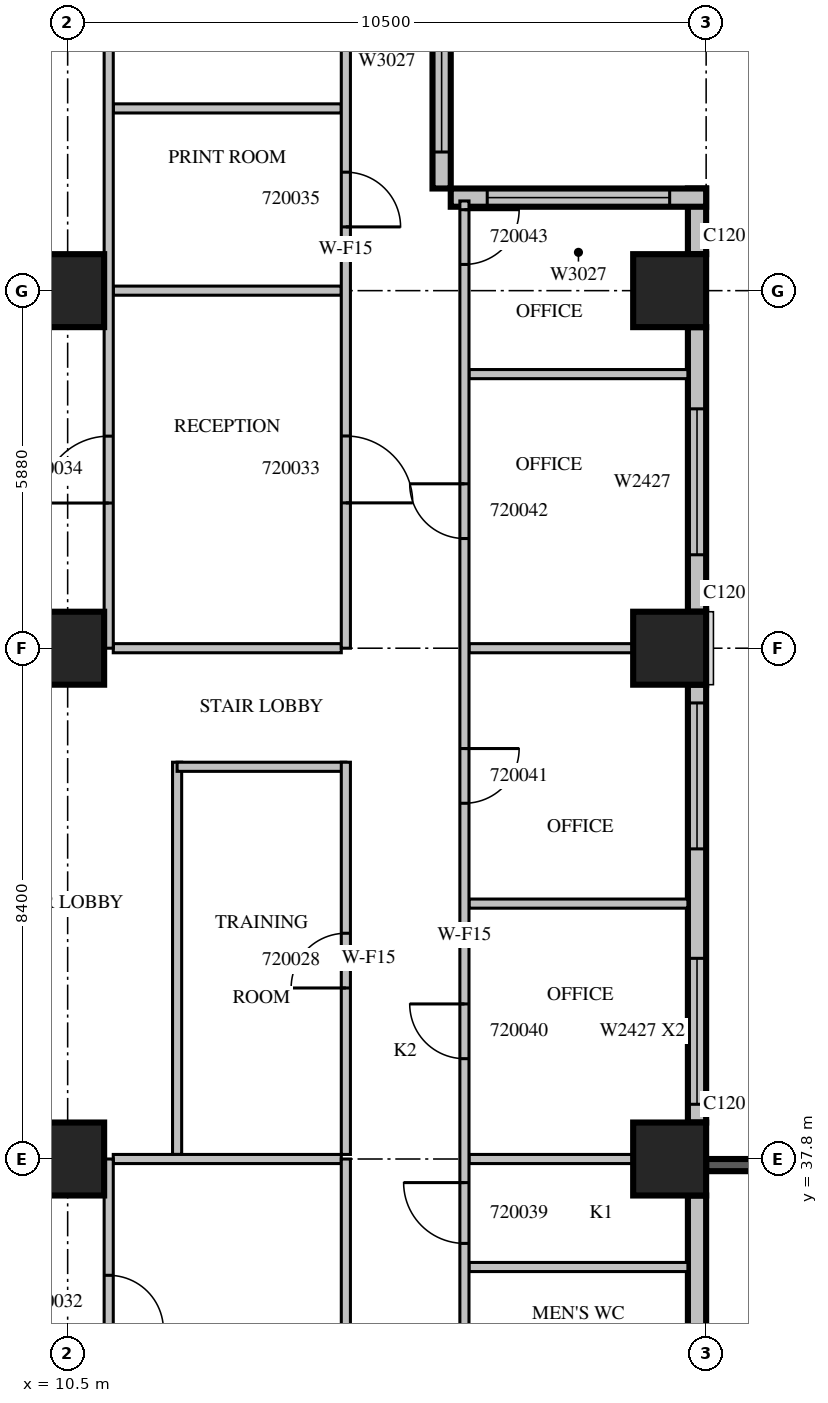
"""IFC4 building model, lengths in metres.
Left out: names, types, materials, properties, quantities, classifications, styles, units other than length and angle.
Written with IfcOpenShell. Run it as: python <this file> out.ifc"""

import sys

from ifc_helpers import new_model, si_unit, direction, frame, frame_2d, origin, origin_2d, place, context, subcontext, project, spatial, rectangle, extrude, source, transform, mapped, element, fill, save


model = new_model("IFC4")
c1 = context("Model", 3, precision=1e-05, world=origin(), true_north=direction((0.0, 1.0)))
c2 = subcontext(c1, "Body", "Model", "MODEL_VIEW")
j1 = project(units=[si_unit("LENGTHUNIT", "METRE"), si_unit("PLANEANGLEUNIT", "RADIAN")], contexts=[c1])
p1 = place(None, origin())
s1 = spatial("IfcSite", under=j1, at=p1, CompositionType="ELEMENT")
p2 = place(p1, origin())
s2 = spatial("IfcBuilding", under=s1, at=p2, CompositionType="ELEMENT")
p3 = place(p2, frame((0.0, 0.0, 95.1)))
s3 = spatial("IfcBuildingStorey", under=s2, at=p3, CompositionType="ELEMENT", Elevation=95.1)
m1 = source(origin(), c2, "Body", "SweptSolid", [
    extrude(rectangle(XDim=1.2, YDim=1.2, at=origin_2d()), origin(), (0.0, 0.0, 1.0), 4.2),
])
for number, where, z_axis, x_axis in (
    (1, (10.5, 37.8, 0.0), (0.0, 0.0, 1.0), (1.0, 0.0, 0.0)),
    (2, (20.4, 37.8, 0.0), (0.0, 0.0, 1.0), (1.0, 0.0, 0.0)),
    (3, (10.5, 46.2, 0.0), (0.0, 0.0, 1.0), (1.0, 0.0, 0.0)),
    (4, (20.4, 46.2, 0.0), (0.0, 0.0, 1.0), (1.0, 0.0, 0.0)),
    (5, (10.5, 52.08, 0.0), (0.0, 0.0, 1.0), (1.0, 0.0, 0.0)),
    (6, (20.4, 52.08, 0.0), (0.0, 0.0, 1.0), (1.0, 0.0, 0.0)),
):
    element("IfcColumn", number, at=place(p3, frame(where, z_axis=z_axis, x_axis=x_axis)), inside=s3, PredefinedType="COLUMN", context=c2, shape_type="MappedRepresentation", body=[
        mapped(m1, transform((0.0, 0.0, 0.0), scale=1.0)),
    ])
m2 = source(origin(), c2, "Body", "SweptSolid", [
    extrude(rectangle(XDim=3.9, YDim=0.2, at=frame_2d((1.95, 0.0))), origin(), (0.0, 0.0, 1.0), 3.8),
])
p4 = place(p3, frame((21.0, 37.7, 0.0), z_axis=(0.0, 0.0, 1.0), x_axis=(1.0, 0.0, 0.0)))
e7 = element("IfcWall", 7, at=p4, inside=s3, PredefinedType="SOLIDWALL", context=c2, shape_type="MappedRepresentation", body=[
    mapped(m2, transform((0.0, 0.0, 0.0), scale=1.0)),
])
m3 = source(origin(), c2, "Body", "SweptSolid", [
    extrude(rectangle(XDim=2.4, YDim=2.7, at=frame_2d((1.2, 1.35))), frame((0.0, 0.11, 0.0), z_axis=(0.0, -1.0, 0.0), x_axis=(1.0, 0.0, 0.0)), (0.0, 0.0, 1.0), 0.22),
])
p5 = place(p4, frame((0.75, 0.0, 0.6)))
e8 = element("IfcOpeningElement", 8, at=p5, cuts=e7, PredefinedType="OPENING", context=c2, shape_type="MappedRepresentation", body=[
    mapped(m3, transform((0.0, 0.0, 0.0), scale=1.0)),
])
m4 = source(origin(), c2, "Body", "SweptSolid", [
    extrude(rectangle(XDim=7.2, YDim=0.3, at=frame_2d((3.6, 0.0))), origin(), (0.0, 0.0, 1.0), 3.8),
])
p6 = place(p3, frame((20.85, 30.0, 0.0), z_axis=(0.0, 0.0, 1.0), x_axis=(0.0, 1.0, 0.0)))
e9 = element("IfcWall", 9, at=p6, inside=s3, PredefinedType="STANDARD", context=c2, shape_type="MappedRepresentation", body=[
    mapped(m4, transform((0.0, 0.0, 0.0), scale=1.0)),
])
m5 = source(origin(), c2, "Body", "SweptSolid", [
    extrude(rectangle(XDim=1.0, YDim=2.1, at=frame_2d((0.5, 1.05))), frame((0.0, 0.16, 0.0), z_axis=(0.0, -1.0, 0.0), x_axis=(1.0, 0.0, 0.0)), (0.0, 0.0, 1.0), 0.32),
])
p7 = place(p6, frame((1.0, 0.0, 0.0)))
e10 = element("IfcOpeningElement", 10, at=p7, cuts=e9, PredefinedType="OPENING", context=c2, shape_type="MappedRepresentation", body=[
    mapped(m5, transform((0.0, 0.0, 0.0), scale=1.0)),
])
p8 = place(p3, frame((20.85, 38.4, 0.0), z_axis=(0.0, 0.0, 1.0), x_axis=(0.0, 1.0, 0.0)))
e11 = element("IfcWall", 11, at=p8, inside=s3, PredefinedType="STANDARD", context=c2, shape_type="MappedRepresentation", body=[
    mapped(m4, transform((0.0, 0.0, 0.0), scale=1.0)),
])
m6 = source(origin(), c2, "Body", "SweptSolid", [
    extrude(rectangle(XDim=2.4, YDim=2.7, at=frame_2d((1.2, 1.35))), frame((0.0, 0.16, 0.0), z_axis=(0.0, -1.0, 0.0), x_axis=(1.0, 0.0, 0.0)), (0.0, 0.0, 1.0), 0.32),
])
p9 = place(p8, frame((0.3, 0.0, 0.6)))
e12 = element("IfcOpeningElement", 12, at=p9, cuts=e11, PredefinedType="OPENING", context=c2, shape_type="MappedRepresentation", body=[
    mapped(m6, transform((0.0, 0.0, 0.0), scale=1.0)),
])
p10 = place(p8, frame((4.5, 0.0, 0.6)))
e13 = element("IfcOpeningElement", 13, at=p10, cuts=e11, PredefinedType="OPENING", context=c2, shape_type="MappedRepresentation", body=[
    mapped(m6, transform((0.0, 0.0, 0.0), scale=1.0)),
])
m7 = source(origin(), c2, "Body", "SweptSolid", [
    extrude(rectangle(XDim=4.68, YDim=0.3, at=frame_2d((2.34, 0.0))), origin(), (0.0, 0.0, 1.0), 3.8),
])
p11 = place(p3, frame((20.85, 46.8, 0.0), z_axis=(0.0, 0.0, 1.0), x_axis=(0.0, 1.0, 0.0)))
e14 = element("IfcWall", 14, at=p11, inside=s3, PredefinedType="STANDARD", context=c2, shape_type="MappedRepresentation", body=[
    mapped(m7, transform((0.0, 0.0, 0.0), scale=1.0)),
])
p12 = place(p11, frame((0.936, 0.0, 0.6)))
e15 = element("IfcOpeningElement", 15, at=p12, cuts=e14, PredefinedType="OPENING", context=c2, shape_type="MappedRepresentation", body=[
    mapped(m6, transform((0.0, 0.0, 0.0), scale=1.0)),
])
m8 = source(origin(), c2, "Body", "SweptSolid", [
    extrude(rectangle(XDim=1.08, YDim=0.3, at=frame_2d((0.54, 0.0))), origin(), (0.0, 0.0, 1.0), 3.8),
])
p13 = place(p3, frame((20.85, 52.68, 0.0), z_axis=(0.0, 0.0, 1.0), x_axis=(0.0, 1.0, 0.0)))
e16 = element("IfcWall", 16, at=p13, inside=s3, PredefinedType="STANDARD", context=c2, shape_type="MappedRepresentation", body=[
    mapped(m8, transform((0.0, 0.0, 0.0), scale=1.0)),
])
m9 = source(origin(), c2, "Body", "SweptSolid", [
    extrude(rectangle(XDim=4.2, YDim=0.3, at=frame_2d((2.1, 0.0))), origin(), (0.0, 0.0, 1.0), 3.8),
])
p14 = place(p3, frame((21.0, 53.61, 0.0), z_axis=(0.0, 0.0, 1.0), x_axis=(-1.0, 0.0, 0.0)))
e17 = element("IfcWall", 17, at=p14, inside=s3, PredefinedType="STANDARD", context=c2, shape_type="MappedRepresentation", body=[
    mapped(m9, transform((0.0, 0.0, 0.0), scale=1.0)),
])
m10 = source(origin(), c2, "Body", "SweptSolid", [
    extrude(rectangle(XDim=3.0, YDim=2.7, at=frame_2d((1.5, 1.35))), frame((0.0, 0.16, 0.0), z_axis=(0.0, -1.0, 0.0), x_axis=(1.0, 0.0, 0.0)), (0.0, 0.0, 1.0), 0.32),
])
p15 = place(p14, frame((0.6, 0.0, 0.6)))
e18 = element("IfcOpeningElement", 18, at=p15, cuts=e17, PredefinedType="OPENING", context=c2, shape_type="MappedRepresentation", body=[
    mapped(m10, transform((0.0, 0.0, 0.0), scale=1.0)),
])
p16 = place(p3, frame((16.65, 53.76, 0.0), z_axis=(0.0, 0.0, 1.0), x_axis=(0.0, 1.0, 0.0)))
e19 = element("IfcWall", 19, at=p16, inside=s3, PredefinedType="STANDARD", context=c2, shape_type="MappedRepresentation", body=[
    mapped(m9, transform((0.0, 0.0, 0.0), scale=1.0)),
])
p17 = place(p16, frame((0.6, 0.0, 0.6)))
e20 = element("IfcOpeningElement", 20, at=p17, cuts=e19, PredefinedType="OPENING", context=c2, shape_type="MappedRepresentation", body=[
    mapped(m10, transform((0.0, 0.0, 0.0), scale=1.0)),
])
m11 = source(origin(), c2, "Body", "SweptSolid", [
    extrude(rectangle(XDim=6.45, YDim=0.15, at=frame_2d((3.225, 0.0))), origin(), (0.0, 0.0, 1.0), 3.8),
])
p18 = place(p3, frame((12.3, 44.325, 0.0), z_axis=(0.0, 0.0, 1.0), x_axis=(0.0, -1.0, 0.0)))
e21 = element("IfcWall", 21, at=p18, inside=s3, PredefinedType="PARTITIONING", context=c2, shape_type="MappedRepresentation", body=[
    mapped(m11, transform((0.0, 0.0, 0.0), scale=1.0)),
])
m12 = source(origin(), c2, "Body", "SweptSolid", [
    extrude(rectangle(XDim=2.775, YDim=0.15, at=frame_2d((1.387, 0.0))), origin(), (0.0, 0.0, 1.0), 3.8),
])
p19 = place(p3, frame((15.075, 44.25, 0.0), z_axis=(0.0, 0.0, 1.0), x_axis=(-1.0, 0.0, 0.0)))
e22 = element("IfcWall", 22, at=p19, inside=s3, PredefinedType="PARTITIONING", context=c2, shape_type="MappedRepresentation", body=[
    mapped(m12, transform((0.0, 0.0, 0.0), scale=1.0)),
])
p20 = place(p3, frame((15.075, 37.875, 0.0), z_axis=(0.0, 0.0, 1.0), x_axis=(0.0, 1.0, 0.0)))
e23 = element("IfcWall", 23, at=p20, inside=s3, PredefinedType="PARTITIONING", context=c2, shape_type="MappedRepresentation", body=[
    mapped(m11, transform((0.0, 0.0, 0.0), scale=1.0)),
])
m13 = source(origin(), c2, "Body", "SweptSolid", [
    extrude(rectangle(XDim=0.9, YDim=2.1, at=frame_2d((0.45, 1.05))), frame((0.0, 0.085, 0.0), z_axis=(0.0, -1.0, 0.0), x_axis=(1.0, 0.0, 0.0)), (0.0, 0.0, 1.0), 0.17),
])
p21 = place(p20, frame((2.737, 0.0, 0.0)))
e24 = element("IfcOpeningElement", 24, at=p21, cuts=e23, PredefinedType="OPENING", context=c2, shape_type="MappedRepresentation", body=[
    mapped(m13, transform((0.0, 0.0, 0.0), scale=1.0)),
])
m14 = source(origin(), c2, "Body", "SweptSolid", [
    extrude(rectangle(XDim=3.75, YDim=0.15, at=frame_2d((1.875, 0.0))), origin(), (0.0, 0.0, 1.0), 3.8),
])
p22 = place(p3, frame((15.0, 37.8, 0.0), z_axis=(0.0, 0.0, 1.0), x_axis=(-1.0, 0.0, 0.0)))
e25 = element("IfcWall", 25, at=p22, inside=s3, PredefinedType="PARTITIONING", context=c2, shape_type="MappedRepresentation", body=[
    mapped(m14, transform((0.0, 0.0, 0.0), scale=1.0)),
])
m15 = source(origin(), c2, "Body", "SweptSolid", [
    extrude(rectangle(XDim=8.4, YDim=0.15, at=frame_2d((4.2, 0.0))), origin(), (0.0, 0.0, 1.0), 3.8),
])
p23 = place(p3, frame((11.175, 29.4, 0.0), z_axis=(0.0, 0.0, 1.0), x_axis=(0.0, 1.0, 0.0)))
e26 = element("IfcWall", 26, at=p23, inside=s3, PredefinedType="PARTITIONING", context=c2, shape_type="MappedRepresentation", body=[
    mapped(m15, transform((0.0, 0.0, 0.0), scale=1.0)),
])
p24 = place(p23, frame((1.962, 0.0, 0.0)))
e27 = element("IfcOpeningElement", 27, at=p24, cuts=e26, PredefinedType="OPENING", context=c2, shape_type="MappedRepresentation", body=[
    mapped(m13, transform((0.0, 0.0, 0.0), scale=1.0)),
])
p25 = place(p23, frame((5.588, 0.0, 0.0)))
e28 = element("IfcOpeningElement", 28, at=p25, cuts=e26, PredefinedType="OPENING", context=c2, shape_type="MappedRepresentation", body=[
    mapped(m13, transform((0.0, 0.0, 0.0), scale=1.0)),
])
for number, where, z_axis, x_axis in (
    (29, (15.0, 52.08, 0.0), (0.0, 0.0, 1.0), (-1.0, 0.0, 0.0)),
    (30, (15.0, 55.077, 0.0), (0.0, 0.0, 1.0), (-1.0, 0.0, 0.0)),
    (31, (15.0, 46.2, 0.0), (0.0, 0.0, 1.0), (-1.0, 0.0, 0.0)),
):
    element("IfcWall", number, at=place(p3, frame(where, z_axis=z_axis, x_axis=x_axis)), inside=s3, PredefinedType="PARTITIONING", context=c2, shape_type="MappedRepresentation", body=[
        mapped(m14, transform((0.0, 0.0, 0.0), scale=1.0)),
    ])
m16 = source(origin(), c2, "Body", "SweptSolid", [
    extrude(rectangle(XDim=13.14, YDim=0.15, at=frame_2d((6.57, 0.0))), origin(), (0.0, 0.0, 1.0), 3.8),
])
p26 = place(p3, frame((11.175, 46.2, 0.0), z_axis=(0.0, 0.0, 1.0), x_axis=(0.0, 1.0, 0.0)))
e32 = element("IfcWall", 32, at=p26, inside=s3, PredefinedType="PARTITIONING", context=c2, shape_type="MappedRepresentation", body=[
    mapped(m16, transform((0.0, 0.0, 0.0), scale=1.0)),
])
m17 = source(origin(), c2, "Body", "SweptSolid", [
    extrude(rectangle(XDim=1.1, YDim=2.1, at=frame_2d((0.55, 1.05))), frame((0.0, 0.085, 0.0), z_axis=(0.0, -1.0, 0.0), x_axis=(1.0, 0.0, 0.0)), (0.0, 0.0, 1.0), 0.17),
])
p27 = place(p26, frame((2.388, 0.0, 0.0)))
e33 = element("IfcOpeningElement", 33, at=p27, cuts=e32, PredefinedType="OPENING", context=c2, shape_type="MappedRepresentation", body=[
    mapped(m17, transform((0.0, 0.0, 0.0), scale=1.0)),
])
m18 = source(origin(), c2, "Body", "SweptSolid", [
    extrude(rectangle(XDim=3.6, YDim=0.15, at=frame_2d((1.8, 0.0))), origin(), (0.0, 0.0, 1.0), 3.8),
])
for number, where, z_axis, x_axis in (
    (34, (17.1, 36.024, 0.0), (0.0, 0.0, 1.0), (1.0, 0.0, 0.0)),
    (35, (17.1, 42.0, 0.0), (0.0, 0.0, 1.0), (1.0, 0.0, 0.0)),
    (36, (17.1, 50.708, 0.0), (0.0, 0.0, 1.0), (1.0, 0.0, 0.0)),
):
    element("IfcWall", number, at=place(p3, frame(where, z_axis=z_axis, x_axis=x_axis)), inside=s3, PredefinedType="PARTITIONING", context=c2, shape_type="MappedRepresentation", body=[
        mapped(m18, transform((0.0, 0.0, 0.0), scale=1.0)),
    ])
m19 = source(origin(), c2, "Body", "SweptSolid", [
    extrude(rectangle(XDim=2.701, YDim=0.15, at=frame_2d((1.351, 0.0))), origin(), (0.0, 0.0, 1.0), 3.8),
])
for number, where, z_axis, x_axis in (
    (37, (19.801, 37.8, 0.0), (0.0, 0.0, 1.0), (-1.0, 0.0, 0.0)),
    (38, (19.801, 46.2, 0.0), (0.0, 0.0, 1.0), (-1.0, 0.0, 0.0)),
):
    element("IfcWall", number, at=place(p3, frame(where, z_axis=z_axis, x_axis=x_axis)), inside=s3, PredefinedType="PARTITIONING", context=c2, shape_type="MappedRepresentation", body=[
        mapped(m19, transform((0.0, 0.0, 0.0), scale=1.0)),
    ])
p28 = place(p3, frame((15.075, 29.4, 0.0), z_axis=(0.0, 0.0, 1.0), x_axis=(0.0, 1.0, 0.0)))
e39 = element("IfcWall", 39, at=p28, inside=s3, PredefinedType="PARTITIONING", context=c2, shape_type="MappedRepresentation", body=[
    mapped(m15, transform((0.0, 0.0, 0.0), scale=1.0)),
])
m20 = source(origin(), c2, "Body", "SweptSolid", [
    extrude(rectangle(XDim=1.2, YDim=2.1, at=frame_2d((0.6, 1.05))), frame((0.0, 0.085, 0.0), z_axis=(0.0, -1.0, 0.0), x_axis=(1.0, 0.0, 0.0)), (0.0, 0.0, 1.0), 0.17),
])
p29 = place(p28, frame((3.6, 0.0, 0.0)))
e40 = element("IfcOpeningElement", 40, at=p29, cuts=e39, PredefinedType="OPENING", context=c2, shape_type="MappedRepresentation", body=[
    mapped(m20, transform((0.0, 0.0, 0.0), scale=1.0)),
])
p30 = place(p3, frame((15.075, 46.2, 0.0), z_axis=(0.0, 0.0, 1.0), x_axis=(0.0, 1.0, 0.0)))
e41 = element("IfcWall", 41, at=p30, inside=s3, PredefinedType="PARTITIONING", context=c2, shape_type="MappedRepresentation", body=[
    mapped(m16, transform((0.0, 0.0, 0.0), scale=1.0)),
])
p31 = place(p30, frame((2.39, 0.0, 0.0)))
e42 = element("IfcOpeningElement", 42, at=p31, cuts=e41, PredefinedType="OPENING", context=c2, shape_type="MappedRepresentation", body=[
    mapped(m17, transform((0.0, 0.0, 0.0), scale=1.0)),
])
p32 = place(p30, frame((6.928, 0.0, 0.0)))
e43 = element("IfcOpeningElement", 43, at=p32, cuts=e41, PredefinedType="OPENING", context=c2, shape_type="MappedRepresentation", body=[
    mapped(m13, transform((0.0, 0.0, 0.0), scale=1.0)),
])
p33 = place(p30, frame((10.596, 0.0, 0.0)))
e44 = element("IfcOpeningElement", 44, at=p33, cuts=e41, PredefinedType="OPENING", context=c2, shape_type="MappedRepresentation", body=[
    mapped(m13, transform((0.0, 0.0, 0.0), scale=1.0)),
])
m21 = source(origin(), c2, "Body", "SweptSolid", [
    extrude(rectangle(XDim=24.155, YDim=0.15, at=frame_2d((12.078, 0.0))), origin(), (0.0, 0.0, 1.0), 3.8),
])
p34 = place(p3, frame((17.025, 53.555, 0.0), z_axis=(0.0, 0.0, 1.0), x_axis=(0.0, -1.0, 0.0)))
e45 = element("IfcWall", 45, at=p34, inside=s3, PredefinedType="PARTITIONING", context=c2, shape_type="MappedRepresentation", body=[
    mapped(m21, transform((0.0, 0.0, 0.0), scale=1.0)),
])
m22 = source(origin(), c2, "Body", "SweptSolid", [
    extrude(rectangle(XDim=1.0, YDim=2.1, at=frame_2d((0.5, 1.05))), frame((0.0, 0.085, 0.0), z_axis=(0.0, -1.0, 0.0), x_axis=(1.0, 0.0, 0.0)), (0.0, 0.0, 1.0), 0.17),
])
p35 = place(p34, frame((21.798, 0.0, 0.0)))
e46 = element("IfcOpeningElement", 46, at=p35, cuts=e45, PredefinedType="OPENING", context=c2, shape_type="MappedRepresentation", body=[
    mapped(m22, transform((0.0, 0.0, 0.0), scale=1.0)),
])
p36 = place(p34, frame((18.486, 0.0, 0.0)))
e47 = element("IfcOpeningElement", 47, at=p36, cuts=e45, PredefinedType="OPENING", context=c2, shape_type="MappedRepresentation", body=[
    mapped(m22, transform((0.0, 0.0, 0.0), scale=1.0)),
])
p37 = place(p34, frame((16.143, 0.0, 0.0)))
e48 = element("IfcOpeningElement", 48, at=p37, cuts=e45, PredefinedType="OPENING", context=c2, shape_type="MappedRepresentation", body=[
    mapped(m22, transform((0.0, 0.0, 0.0), scale=1.0)),
])
p38 = place(p34, frame((13.205, 0.0, 0.0)))
e49 = element("IfcOpeningElement", 49, at=p38, cuts=e45, PredefinedType="OPENING", context=c2, shape_type="MappedRepresentation", body=[
    mapped(m13, transform((0.0, 0.0, 0.0), scale=1.0)),
])
p39 = place(p34, frame((9.005, 0.0, 0.0)))
e50 = element("IfcOpeningElement", 50, at=p39, cuts=e45, PredefinedType="OPENING", context=c2, shape_type="MappedRepresentation", body=[
    mapped(m13, transform((0.0, 0.0, 0.0), scale=1.0)),
])
p40 = place(p34, frame((4.651, 0.0, 0.0)))
e51 = element("IfcOpeningElement", 51, at=p40, cuts=e45, PredefinedType="OPENING", context=c2, shape_type="MappedRepresentation", body=[
    mapped(m13, transform((0.0, 0.0, 0.0), scale=1.0)),
])
p41 = place(p34, frame((0.144, 0.0, 0.0)))
e52 = element("IfcOpeningElement", 52, at=p41, cuts=e45, PredefinedType="OPENING", context=c2, shape_type="MappedRepresentation", body=[
    mapped(m13, transform((0.0, 0.0, 0.0), scale=1.0)),
])
m23 = source(origin(), c2, "Body", "SweptSolid", [
    extrude(rectangle(XDim=2.4, YDim=2.7, at=frame_2d((1.2, 1.35))), frame((0.0, 0.03, 0.0), z_axis=(0.0, -1.0, 0.0), x_axis=(1.0, 0.0, 0.0)), (0.0, 0.0, 1.0), 0.06),
])
p42 = place(p9, origin())
e53 = element("IfcWindow", 53, at=p42, inside=s3, PartitioningType="SINGLE_PANEL", PredefinedType="WINDOW", context=c2, shape_type="MappedRepresentation", body=[
    mapped(m23, transform((0.0, 0.0, 0.0), scale=1.0)),
])
fill(e12, e53)
p43 = place(p10, origin())
e54 = element("IfcWindow", 54, at=p43, inside=s3, PartitioningType="SINGLE_PANEL", PredefinedType="WINDOW", context=c2, shape_type="MappedRepresentation", body=[
    mapped(m23, transform((0.0, 0.0, 0.0), scale=1.0)),
])
fill(e13, e54)
p44 = place(p12, origin())
e55 = element("IfcWindow", 55, at=p44, inside=s3, PartitioningType="SINGLE_PANEL", PredefinedType="WINDOW", context=c2, shape_type="MappedRepresentation", body=[
    mapped(m23, transform((0.0, 0.0, 0.0), scale=1.0)),
])
fill(e15, e55)
m24 = source(origin(), c2, "Body", "SweptSolid", [
    extrude(rectangle(XDim=3.0, YDim=2.7, at=frame_2d((1.5, 1.35))), frame((0.0, 0.03, 0.0), z_axis=(0.0, -1.0, 0.0), x_axis=(1.0, 0.0, 0.0)), (0.0, 0.0, 1.0), 0.06),
])
p45 = place(p15, origin())
e56 = element("IfcWindow", 56, at=p45, inside=s3, PartitioningType="SINGLE_PANEL", PredefinedType="WINDOW", context=c2, shape_type="MappedRepresentation", body=[
    mapped(m24, transform((0.0, 0.0, 0.0), scale=1.0)),
])
fill(e18, e56)
p46 = place(p17, origin())
e57 = element("IfcWindow", 57, at=p46, inside=s3, PartitioningType="SINGLE_PANEL", PredefinedType="WINDOW", context=c2, shape_type="MappedRepresentation", body=[
    mapped(m24, transform((0.0, 0.0, 0.0), scale=1.0)),
])
fill(e20, e57)
m25 = source(origin(), c2, "Body", "SweptSolid", [
    extrude(rectangle(XDim=0.9, YDim=2.1, at=frame_2d((0.45, 1.05))), frame((0.0, 0.025, 0.0), z_axis=(0.0, -1.0, 0.0), x_axis=(1.0, 0.0, 0.0)), (0.0, 0.0, 1.0), 0.05),
])
p47 = place(p21, origin())
e58 = element("IfcDoor", 58, at=p47, inside=s3, OperationType="SINGLE_SWING_LEFT", PredefinedType="DOOR", context=c2, shape_type="MappedRepresentation", body=[
    mapped(m25, transform((0.0, 0.0, 0.0), scale=1.0)),
])
fill(e24, e58)
p48 = place(p25, origin())
e59 = element("IfcDoor", 59, at=p48, inside=s3, OperationType="SINGLE_SWING_RIGHT", PredefinedType="DOOR", context=c2, shape_type="MappedRepresentation", body=[
    mapped(m25, transform((0.0, 0.0, 0.0), scale=1.0)),
])
fill(e28, e59)
m26 = source(origin(), c2, "Body", "SweptSolid", [
    extrude(rectangle(XDim=1.1, YDim=2.1, at=frame_2d((0.55, 1.05))), frame((0.0, 0.025, 0.0), z_axis=(0.0, -1.0, 0.0), x_axis=(1.0, 0.0, 0.0)), (0.0, 0.0, 1.0), 0.05),
])
p49 = place(p31, origin())
e60 = element("IfcDoor", 60, at=p49, inside=s3, OperationType="SINGLE_SWING_RIGHT", PredefinedType="DOOR", context=c2, shape_type="MappedRepresentation", body=[
    mapped(m26, transform((0.0, 0.0, 0.0), scale=1.0)),
])
fill(e42, e60)
p50 = place(p27, origin())
e61 = element("IfcDoor", 61, at=p50, inside=s3, OperationType="SINGLE_SWING_LEFT", PredefinedType="DOOR", context=c2, shape_type="MappedRepresentation", body=[
    mapped(m26, transform((0.0, 0.0, 0.0), scale=1.0)),
])
fill(e33, e61)
p51 = place(p32, origin())
e62 = element("IfcDoor", 62, at=p51, inside=s3, OperationType="SINGLE_SWING_RIGHT", PredefinedType="DOOR", context=c2, shape_type="MappedRepresentation", body=[
    mapped(m25, transform((0.0, 0.0, 0.0), scale=1.0)),
])
fill(e43, e62)
m27 = source(origin(), c2, "Body", "SweptSolid", [
    extrude(rectangle(XDim=1.0, YDim=2.1, at=frame_2d((0.5, 1.05))), frame((0.0, 0.025, 0.0), z_axis=(0.0, -1.0, 0.0), x_axis=(1.0, 0.0, 0.0)), (0.0, 0.0, 1.0), 0.05),
])
p52 = place(p37, origin())
e63 = element("IfcDoor", 63, at=p52, inside=s3, OperationType="SINGLE_SWING_RIGHT", PredefinedType="DOOR", context=c2, shape_type="MappedRepresentation", body=[
    mapped(m27, transform((0.0, 0.0, 0.0), scale=1.0)),
])
fill(e48, e63)
p53 = place(p38, origin())
e64 = element("IfcDoor", 64, at=p53, inside=s3, OperationType="SINGLE_SWING_RIGHT", PredefinedType="DOOR", context=c2, shape_type="MappedRepresentation", body=[
    mapped(m25, transform((0.0, 0.0, 0.0), scale=1.0)),
])
fill(e49, e64)
p54 = place(p39, origin())
e65 = element("IfcDoor", 65, at=p54, inside=s3, OperationType="SINGLE_SWING_LEFT", PredefinedType="DOOR", context=c2, shape_type="MappedRepresentation", body=[
    mapped(m25, transform((0.0, 0.0, 0.0), scale=1.0)),
])
fill(e50, e65)
p55 = place(p40, origin())
e66 = element("IfcDoor", 66, at=p55, inside=s3, OperationType="SINGLE_SWING_RIGHT", PredefinedType="DOOR", context=c2, shape_type="MappedRepresentation", body=[
    mapped(m25, transform((0.0, 0.0, 0.0), scale=1.0)),
])
fill(e51, e66)
p56 = place(p41, origin())
e67 = element("IfcDoor", 67, at=p56, inside=s3, OperationType="SINGLE_SWING_LEFT", PredefinedType="DOOR", context=c2, shape_type="MappedRepresentation", body=[
    mapped(m25, transform((0.0, 0.0, 0.0), scale=1.0)),
])
fill(e52, e67)
save(model, sys.argv[1])
